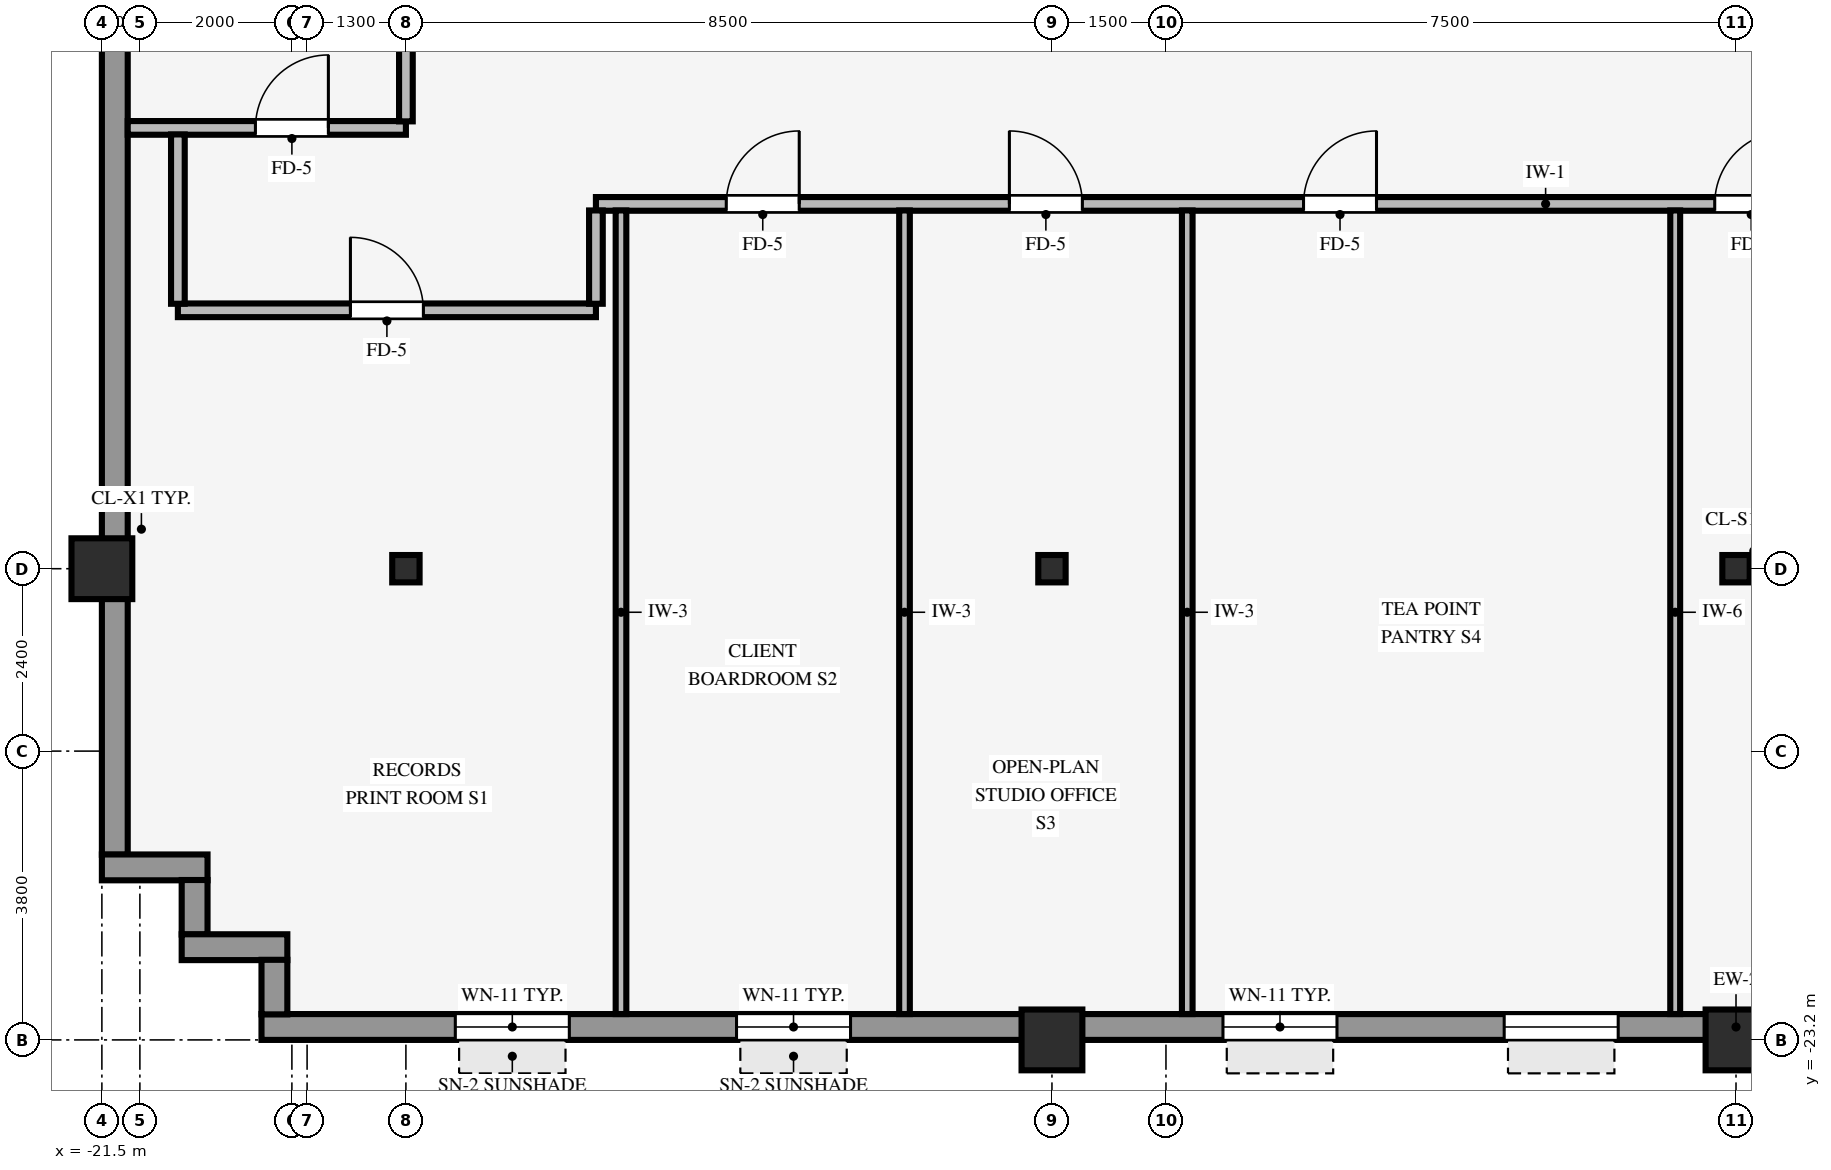
"""IFC4 building model, lengths in metres.
Left out: names, types, materials, properties, quantities, classifications, styles, units other than length and angle.
Written with IfcOpenShell. Run it as: python <this file> out.ifc"""

import sys

from ifc_helpers import new_model, si_unit, direction, frame, frame_2d, origin, origin_2d, place, context, subcontext, project, spatial, rectangle, hollow_rectangle, i_section, extrude, source, transform, mapped, element, fill, save


model = new_model("IFC4")
c1 = context("Model", 3, precision=1e-05, world=origin(), true_north=direction((0.0, 1.0)))
c2 = subcontext(c1, "Body", "Model", "MODEL_VIEW")
j1 = project(units=[si_unit("LENGTHUNIT", "METRE"), si_unit("PLANEANGLEUNIT", "RADIAN")], contexts=[c1])
p1 = place(None, origin())
s1 = spatial("IfcSite", under=j1, at=p1, CompositionType="ELEMENT")
p2 = place(p1, origin())
s2 = spatial("IfcBuilding", under=s1, at=p2, CompositionType="ELEMENT")
p3 = place(p2, frame((0.0, 0.0, 60.45)))
s3 = spatial("IfcBuildingStorey", under=s2, at=p3, CompositionType="ELEMENT", Elevation=60.45)
for number, where, z_axis, x_axis in (
    (1, (-21.5, -17.0, 0.0), (0.0, 0.0, 1.0), (1.0, 0.0, 0.0)),
    (2, (-9.0, -23.2, 0.0), (0.0, 0.0, 1.0), (1.0, 0.0, 0.0)),
    (3, (0.0, -23.2, 0.0), (0.0, 0.0, 1.0), (1.0, 0.0, 0.0)),
):
    element("IfcColumn", number, at=place(p3, frame(where, z_axis=z_axis, x_axis=x_axis)), inside=s3, PredefinedType="COLUMN", context=c2, shape_type="SweptSolid", body=[
        extrude(hollow_rectangle(XDim=0.8, YDim=0.8, WallThickness=0.055, InnerFilletRadius=0.055, OuterFilletRadius=0.11, at=origin_2d()), origin(), (0.0, 0.0, 1.0), 3.37),
    ])
for number, where, z_axis, x_axis in (
    (4, (0.0, -17.0, 0.0), (0.0, 0.0, 1.0), (1.0, 0.0, 0.0)),
    (5, (-17.5, -17.0, 0.0), (0.0, 0.0, 1.0), (1.0, 0.0, 0.0)),
    (6, (-9.0, -17.0, 0.0), (0.0, 0.0, 1.0), (1.0, 0.0, 0.0)),
):
    element("IfcColumn", number, at=place(p3, frame(where, z_axis=z_axis, x_axis=x_axis)), inside=s3, PredefinedType="COLUMN", context=c2, shape_type="SweptSolid", body=[
        extrude(i_section(OverallWidth=0.36, OverallDepth=0.36, WebThickness=0.021, FlangeThickness=0.021, FilletRadius=0.018, at=origin_2d()), origin(), (0.0, 0.0, 1.0), 3.37),
    ])
p4 = place(p3, frame((-19.4, -23.03, 0.0), z_axis=(0.0, 0.0, 1.0), x_axis=(1.0, 0.0, 0.0)))
e7 = element("IfcWall", 7, at=p4, inside=s3, PredefinedType="STANDARD", context=c2, shape_type="SweptSolid", body=[
    extrude(rectangle(XDim=38.8, YDim=0.34, at=frame_2d((19.4, 0.0))), origin(), (0.0, 0.0, 1.0), 2.705),
])
p5 = place(p4, frame((2.55, 0.0, 0.8)))
e8 = element("IfcOpeningElement", 8, at=p5, cuts=e7, PredefinedType="OPENING", context=c2, shape_type="SweptSolid", body=[
    extrude(rectangle(XDim=1.5, YDim=1.6, at=frame_2d((0.75, 0.8))), frame((0.0, 0.18, 0.0), z_axis=(0.0, -1.0, 0.0), x_axis=(1.0, 0.0, 0.0)), (0.0, 0.0, 1.0), 0.36),
])
p6 = place(p4, frame((6.25, 0.0, 0.8)))
e9 = element("IfcOpeningElement", 9, at=p6, cuts=e7, PredefinedType="OPENING", context=c2, shape_type="SweptSolid", body=[
    extrude(rectangle(XDim=1.5, YDim=1.6, at=frame_2d((0.75, 0.8))), frame((0.0, 0.18, 0.0), z_axis=(0.0, -1.0, 0.0), x_axis=(1.0, 0.0, 0.0)), (0.0, 0.0, 1.0), 0.36),
])
p7 = place(p4, frame((12.65, 0.0, 0.8)))
e10 = element("IfcOpeningElement", 10, at=p7, cuts=e7, PredefinedType="OPENING", context=c2, shape_type="SweptSolid", body=[
    extrude(rectangle(XDim=1.5, YDim=1.6, at=frame_2d((0.75, 0.8))), frame((0.0, 0.18, 0.0), z_axis=(0.0, -1.0, 0.0), x_axis=(1.0, 0.0, 0.0)), (0.0, 0.0, 1.0), 0.36),
])
p8 = place(p4, frame((16.35, 0.0, 0.8)))
e11 = element("IfcOpeningElement", 11, at=p8, cuts=e7, PredefinedType="OPENING", context=c2, shape_type="SweptSolid", body=[
    extrude(rectangle(XDim=1.5, YDim=1.6, at=frame_2d((0.75, 0.8))), frame((0.0, 0.18, 0.0), z_axis=(0.0, -1.0, 0.0), x_axis=(1.0, 0.0, 0.0)), (0.0, 0.0, 1.0), 0.36),
])
p9 = place(p4, frame((20.95, 0.0, 0.8)))
e12 = element("IfcOpeningElement", 12, at=p9, cuts=e7, PredefinedType="OPENING", context=c2, shape_type="SweptSolid", body=[
    extrude(rectangle(XDim=1.5, YDim=1.6, at=frame_2d((0.75, 0.8))), frame((0.0, 0.18, 0.0), z_axis=(0.0, -1.0, 0.0), x_axis=(1.0, 0.0, 0.0)), (0.0, 0.0, 1.0), 0.36),
])
p10 = place(p4, frame((25.55, 0.0, 0.8)))
e13 = element("IfcOpeningElement", 13, at=p10, cuts=e7, PredefinedType="OPENING", context=c2, shape_type="SweptSolid", body=[
    extrude(rectangle(XDim=1.5, YDim=1.6, at=frame_2d((0.75, 0.8))), frame((0.0, 0.18, 0.0), z_axis=(0.0, -1.0, 0.0), x_axis=(1.0, 0.0, 0.0)), (0.0, 0.0, 1.0), 0.36),
])
p11 = place(p4, frame((30.15, 0.0, 0.8)))
e14 = element("IfcOpeningElement", 14, at=p11, cuts=e7, PredefinedType="OPENING", context=c2, shape_type="SweptSolid", body=[
    extrude(rectangle(XDim=1.5, YDim=1.6, at=frame_2d((0.75, 0.8))), frame((0.0, 0.18, 0.0), z_axis=(0.0, -1.0, 0.0), x_axis=(1.0, 0.0, 0.0)), (0.0, 0.0, 1.0), 0.36),
])
p12 = place(p4, frame((34.75, 0.0, 0.8)))
e15 = element("IfcOpeningElement", 15, at=p12, cuts=e7, PredefinedType="OPENING", context=c2, shape_type="SweptSolid", body=[
    extrude(rectangle(XDim=1.5, YDim=1.6, at=frame_2d((0.75, 0.8))), frame((0.0, 0.18, 0.0), z_axis=(0.0, -1.0, 0.0), x_axis=(1.0, 0.0, 0.0)), (0.0, 0.0, 1.0), 0.36),
])
p13 = place(p3, frame((-21.33, -20.764, 0.0), z_axis=(0.0, 0.0, 1.0), x_axis=(0.0, 1.0, 0.0)))
e16 = element("IfcWall", 16, at=p13, inside=s3, PredefinedType="STANDARD", context=c2, shape_type="SweptSolid", body=[
    extrude(rectangle(XDim=41.528, YDim=0.34, at=frame_2d((20.764, 0.0))), origin(), (0.0, 0.0, 1.0), 2.705),
])
p14 = place(p13, frame((15.364, 0.0, 0.0)))
e17 = element("IfcOpeningElement", 17, at=p14, cuts=e16, PredefinedType="OPENING", context=c2, shape_type="SweptSolid", body=[
    extrude(rectangle(XDim=1.05, YDim=2.1, at=frame_2d((0.525, 1.05))), frame((0.0, 0.18, 0.0), z_axis=(0.0, -1.0, 0.0), x_axis=(1.0, 0.0, 0.0)), (0.0, 0.0, 1.0), 0.36),
])
p15 = place(p13, frame((12.202, 0.0, 0.8)))
e18 = element("IfcOpeningElement", 18, at=p15, cuts=e16, PredefinedType="OPENING", context=c2, shape_type="SweptSolid", body=[
    extrude(rectangle(XDim=2.3, YDim=1.62, at=frame_2d((1.15, 0.81))), frame((0.0, 0.18, 0.0), z_axis=(0.0, -1.0, 0.0), x_axis=(1.0, 0.0, 0.0)), (0.0, 0.0, 1.0), 0.36),
])
p16 = place(p13, frame((17.144, 0.0, 0.8)))
e19 = element("IfcOpeningElement", 19, at=p16, cuts=e16, PredefinedType="OPENING", context=c2, shape_type="SweptSolid", body=[
    extrude(rectangle(XDim=2.3, YDim=1.62, at=frame_2d((1.15, 0.81))), frame((0.0, 0.18, 0.0), z_axis=(0.0, -1.0, 0.0), x_axis=(1.0, 0.0, 0.0)), (0.0, 0.0, 1.0), 0.36),
])
p17 = place(p13, frame((27.025, 0.0, 0.8)))
e20 = element("IfcOpeningElement", 20, at=p17, cuts=e16, PredefinedType="OPENING", context=c2, shape_type="SweptSolid", body=[
    extrude(rectangle(XDim=2.3, YDim=1.62, at=frame_2d((1.15, 0.81))), frame((0.0, 0.18, 0.0), z_axis=(0.0, -1.0, 0.0), x_axis=(1.0, 0.0, 0.0)), (0.0, 0.0, 1.0), 0.36),
])
p18 = place(p3, frame((-21.5, -20.93, 0.0), z_axis=(0.0, 0.0, 1.0), x_axis=(1.0, 0.0, 0.0)))
e21 = element("IfcWall", 21, at=p18, inside=s3, PredefinedType="STANDARD", context=c2, shape_type="SweptSolid", body=[
    extrude(rectangle(XDim=1.39, YDim=0.34, at=frame_2d((0.695, 0.0))), origin(), (0.0, 0.0, 1.0), 3.36),
])
p19 = place(p3, frame((-20.28, -21.814, 0.0), z_axis=(0.0, 0.0, 1.0), x_axis=(0.0, 1.0, 0.0)))
e22 = element("IfcWall", 22, at=p19, inside=s3, PredefinedType="STANDARD", context=c2, shape_type="SweptSolid", body=[
    extrude(rectangle(XDim=0.718, YDim=0.34, at=frame_2d((0.359, 0.0))), origin(), (0.0, 0.0, 1.0), 3.36),
])
p20 = place(p3, frame((-20.45, -21.98, 0.0), z_axis=(0.0, 0.0, 1.0), x_axis=(1.0, 0.0, 0.0)))
e23 = element("IfcWall", 23, at=p20, inside=s3, PredefinedType="STANDARD", context=c2, shape_type="SweptSolid", body=[
    extrude(rectangle(XDim=1.39, YDim=0.34, at=frame_2d((0.695, 0.0))), origin(), (0.0, 0.0, 1.0), 3.36),
])
p21 = place(p3, frame((-19.23, -22.864, 0.0), z_axis=(0.0, 0.0, 1.0), x_axis=(0.0, 1.0, 0.0)))
e24 = element("IfcWall", 24, at=p21, inside=s3, PredefinedType="STANDARD", context=c2, shape_type="SweptSolid", body=[
    extrude(rectangle(XDim=0.718, YDim=0.34, at=frame_2d((0.359, 0.0))), origin(), (0.0, 0.0, 1.0), 3.36),
])
p22 = place(p3, frame((-20.5, -13.6, 0.0), z_axis=(0.0, 0.0, 1.0), x_axis=(1.0, 0.0, 0.0)))
e25 = element("IfcWall", 25, at=p22, inside=s3, PredefinedType="PARTITIONING", context=c2, shape_type="SweptSolid", body=[
    extrude(rectangle(XDim=5.5, YDim=0.18, at=frame_2d((2.75, 0.0))), origin(), (0.0, 0.0, 1.0), 2.942),
])
p23 = place(p22, frame((2.27, 0.0, 0.0)))
e26 = element("IfcOpeningElement", 26, at=p23, cuts=e25, PredefinedType="OPENING", context=c2, shape_type="SweptSolid", body=[
    extrude(rectangle(XDim=0.96, YDim=2.1, at=frame_2d((0.48, 1.05))), frame((0.0, 0.1, 0.0), z_axis=(0.0, -1.0, 0.0), x_axis=(1.0, 0.0, 0.0)), (0.0, 0.0, 1.0), 0.2),
])
p24 = place(p3, frame((-15.0, -12.2, 0.0), z_axis=(0.0, 0.0, 1.0), x_axis=(1.0, 0.0, 0.0)))
e27 = element("IfcWall", 27, at=p24, inside=s3, PredefinedType="PARTITIONING", context=c2, shape_type="SweptSolid", body=[
    extrude(rectangle(XDim=23.8, YDim=0.18, at=frame_2d((11.9, 0.0))), origin(), (0.0, 0.0, 1.0), 3.36),
])
p25 = place(p24, frame((9.31, 0.0, 0.0)))
e28 = element("IfcOpeningElement", 28, at=p25, cuts=e27, PredefinedType="OPENING", context=c2, shape_type="SweptSolid", body=[
    extrude(rectangle(XDim=0.96, YDim=2.1, at=frame_2d((0.48, 1.05))), frame((0.0, 0.1, 0.0), z_axis=(0.0, -1.0, 0.0), x_axis=(1.0, 0.0, 0.0)), (0.0, 0.0, 1.0), 0.2),
])
p26 = place(p24, frame((1.715, 0.0, 0.0)))
e29 = element("IfcOpeningElement", 29, at=p26, cuts=e27, PredefinedType="OPENING", context=c2, shape_type="SweptSolid", body=[
    extrude(rectangle(XDim=0.96, YDim=2.1, at=frame_2d((0.48, 1.05))), frame((0.0, 0.1, 0.0), z_axis=(0.0, -1.0, 0.0), x_axis=(1.0, 0.0, 0.0)), (0.0, 0.0, 1.0), 0.2),
])
p27 = place(p24, frame((5.44, 0.0, 0.0)))
e30 = element("IfcOpeningElement", 30, at=p27, cuts=e27, PredefinedType="OPENING", context=c2, shape_type="SweptSolid", body=[
    extrude(rectangle(XDim=0.96, YDim=2.1, at=frame_2d((0.48, 1.05))), frame((0.0, 0.1, 0.0), z_axis=(0.0, -1.0, 0.0), x_axis=(1.0, 0.0, 0.0)), (0.0, 0.0, 1.0), 0.2),
])
p28 = place(p24, frame((19.65, 0.0, 0.0)))
e31 = element("IfcOpeningElement", 31, at=p28, cuts=e27, PredefinedType="OPENING", context=c2, shape_type="SweptSolid", body=[
    extrude(rectangle(XDim=0.9, YDim=2.1, at=frame_2d((0.45, 1.05))), frame((0.0, 0.1, 0.0), z_axis=(0.0, -1.0, 0.0), x_axis=(1.0, 0.0, 0.0)), (0.0, 0.0, 1.0), 0.2),
])
p29 = place(p24, frame((17.05, 0.0, 0.0)))
e32 = element("IfcOpeningElement", 32, at=p29, cuts=e27, PredefinedType="OPENING", context=c2, shape_type="SweptSolid", body=[
    extrude(rectangle(XDim=0.9, YDim=2.1, at=frame_2d((0.45, 1.05))), frame((0.0, 0.1, 0.0), z_axis=(0.0, -1.0, 0.0), x_axis=(1.0, 0.0, 0.0)), (0.0, 0.0, 1.0), 0.2),
])
p30 = place(p24, frame((22.15, 0.0, 0.0)))
e33 = element("IfcOpeningElement", 33, at=p30, cuts=e27, PredefinedType="OPENING", context=c2, shape_type="SweptSolid", body=[
    extrude(rectangle(XDim=0.9, YDim=2.1, at=frame_2d((0.45, 1.05))), frame((0.0, 0.1, 0.0), z_axis=(0.0, -1.0, 0.0), x_axis=(1.0, 0.0, 0.0)), (0.0, 0.0, 1.0), 0.2),
])
p31 = place(p24, frame((14.72, 0.0, 0.0)))
e34 = element("IfcOpeningElement", 34, at=p31, cuts=e27, PredefinedType="OPENING", context=c2, shape_type="SweptSolid", body=[
    extrude(rectangle(XDim=0.96, YDim=2.1, at=frame_2d((0.48, 1.05))), frame((0.0, 0.1, 0.0), z_axis=(0.0, -1.0, 0.0), x_axis=(1.0, 0.0, 0.0)), (0.0, 0.0, 1.0), 0.2),
])
p32 = place(p3, frame((-21.16, -11.2, 0.0), z_axis=(0.0, 0.0, 1.0), x_axis=(1.0, 0.0, 0.0)))
e35 = element("IfcWall", 35, at=p32, inside=s3, PredefinedType="PARTITIONING", context=c2, shape_type="SweptSolid", body=[
    extrude(rectangle(XDim=3.66, YDim=0.18, at=frame_2d((1.83, 0.0))), origin(), (0.0, 0.0, 1.0), 3.36),
])
p33 = place(p32, frame((1.68, 0.0, 0.0)))
e36 = element("IfcOpeningElement", 36, at=p33, cuts=e35, PredefinedType="OPENING", context=c2, shape_type="SweptSolid", body=[
    extrude(rectangle(XDim=0.96, YDim=2.1, at=frame_2d((0.48, 1.05))), frame((0.0, 0.1, 0.0), z_axis=(0.0, -1.0, 0.0), x_axis=(1.0, 0.0, 0.0)), (0.0, 0.0, 1.0), 0.2),
])
p34 = place(p3, frame((-20.5, -13.514, 0.0), z_axis=(0.0, 0.0, 1.0), x_axis=(0.0, 1.0, 0.0)))
e37 = element("IfcWall", 37, at=p34, inside=s3, PredefinedType="PARTITIONING", context=c2, shape_type="SweptSolid", body=[
    extrude(rectangle(XDim=2.228, YDim=0.18, at=frame_2d((1.114, 0.0))), origin(), (0.0, 0.0, 1.0), 3.36),
])
p35 = place(p3, frame((-17.5, -11.114, 0.0), z_axis=(0.0, 0.0, 1.0), x_axis=(0.0, 1.0, 0.0)))
e38 = element("IfcWall", 38, at=p35, inside=s3, PredefinedType="PARTITIONING", context=c2, shape_type="SweptSolid", body=[
    extrude(rectangle(XDim=0.968, YDim=0.18, at=frame_2d((0.484, 0.0))), origin(), (0.0, 0.0, 1.0), 2.738),
])
p36 = place(p3, frame((-15.0, -13.514, 0.0), z_axis=(0.0, 0.0, 1.0), x_axis=(0.0, 1.0, 0.0)))
e39 = element("IfcWall", 39, at=p36, inside=s3, PredefinedType="PARTITIONING", context=c2, shape_type="SweptSolid", body=[
    extrude(rectangle(XDim=1.228, YDim=0.18, at=frame_2d((0.614, 0.0))), origin(), (0.0, 0.0, 1.0), 3.36),
])
for number, where, z_axis, x_axis in (
    (40, (-14.67, -22.86, 0.0), (0.0, 0.0, 1.0), (0.0, 1.0, 0.0)),
    (41, (-10.94, -22.86, 0.0), (0.0, 0.0, 1.0), (0.0, 1.0, 0.0)),
    (42, (-7.22, -22.86, 0.0), (0.0, 0.0, 1.0), (0.0, 1.0, 0.0)),
):
    element("IfcWall", number, at=place(p3, frame(where, z_axis=z_axis, x_axis=x_axis)), inside=s3, PredefinedType="PARTITIONING", context=c2, shape_type="SweptSolid", body=[
        extrude(rectangle(XDim=10.574, YDim=0.14, at=frame_2d((5.287, 0.0))), origin(), (0.0, 0.0, 1.0), 3.36),
    ])
p37 = place(p3, frame((-0.8, -22.86, 0.0), z_axis=(0.0, 0.0, 1.0), x_axis=(0.0, 1.0, 0.0)))
e43 = element("IfcWall", 43, at=p37, inside=s3, PredefinedType="PARTITIONING", context=c2, shape_type="SweptSolid", body=[
    extrude(rectangle(XDim=10.574, YDim=0.13, at=frame_2d((5.287, 0.0))), origin(), (0.0, 0.0, 1.0), 3.36),
])
m1 = source(origin(), c2, "Body", "SweptSolid", [
    extrude(rectangle(XDim=1.5, YDim=1.6, at=frame_2d((0.75, 0.8))), frame((0.0, 0.03, 0.0), z_axis=(0.0, -1.0, 0.0), x_axis=(1.0, 0.0, 0.0)), (0.0, 0.0, 1.0), 0.06),
])
p38 = place(p5, origin())
e44 = element("IfcWindow", 44, at=p38, inside=s3, PartitioningType="SINGLE_PANEL", PredefinedType="WINDOW", context=c2, shape_type="MappedRepresentation", body=[
    mapped(m1, transform((0.0, 0.0, 0.0), scale=1.0)),
])
fill(e8, e44)
p39 = place(p6, origin())
e45 = element("IfcWindow", 45, at=p39, inside=s3, PartitioningType="SINGLE_PANEL", PredefinedType="WINDOW", context=c2, shape_type="MappedRepresentation", body=[
    mapped(m1, transform((0.0, 0.0, 0.0), scale=1.0)),
])
fill(e9, e45)
p40 = place(p7, origin())
e46 = element("IfcWindow", 46, at=p40, inside=s3, PartitioningType="SINGLE_PANEL", PredefinedType="WINDOW", context=c2, shape_type="MappedRepresentation", body=[
    mapped(m1, transform((0.0, 0.0, 0.0), scale=1.0)),
])
fill(e10, e46)
p41 = place(p8, origin())
e47 = element("IfcWindow", 47, at=p41, inside=s3, PartitioningType="SINGLE_PANEL", PredefinedType="WINDOW", context=c2, shape_type="MappedRepresentation", body=[
    mapped(m1, transform((0.0, 0.0, 0.0), scale=1.0)),
])
fill(e11, e47)
m2 = source(origin(), c2, "Body", "SweptSolid", [
    extrude(rectangle(XDim=0.96, YDim=2.1, at=frame_2d((0.48, 1.05))), frame((0.0, 0.025, 0.0), z_axis=(0.0, -1.0, 0.0), x_axis=(1.0, 0.0, 0.0)), (0.0, 0.0, 1.0), 0.05),
])
p42 = place(p23, origin())
e48 = element("IfcDoor", 48, at=p42, inside=s3, OperationType="SINGLE_SWING_LEFT", PredefinedType="DOOR", context=c2, shape_type="MappedRepresentation", body=[
    mapped(m2, transform((0.0, 0.0, 0.0), scale=1.0)),
])
fill(e26, e48)
p43 = place(p25, origin())
e49 = element("IfcDoor", 49, at=p43, inside=s3, OperationType="SINGLE_SWING_RIGHT", PredefinedType="DOOR", context=c2, shape_type="MappedRepresentation", body=[
    mapped(m2, transform((0.0, 0.0, 0.0), scale=1.0)),
])
fill(e28, e49)
p44 = place(p26, origin())
e50 = element("IfcDoor", 50, at=p44, inside=s3, OperationType="SINGLE_SWING_RIGHT", PredefinedType="DOOR", context=c2, shape_type="MappedRepresentation", body=[
    mapped(m2, transform((0.0, 0.0, 0.0), scale=1.0)),
])
fill(e29, e50)
p45 = place(p27, origin())
e51 = element("IfcDoor", 51, at=p45, inside=s3, OperationType="SINGLE_SWING_LEFT", PredefinedType="DOOR", context=c2, shape_type="MappedRepresentation", body=[
    mapped(m2, transform((0.0, 0.0, 0.0), scale=1.0)),
])
fill(e30, e51)
p46 = place(p33, origin())
e52 = element("IfcDoor", 52, at=p46, inside=s3, OperationType="SINGLE_SWING_RIGHT", PredefinedType="DOOR", context=c2, shape_type="MappedRepresentation", body=[
    mapped(m2, transform((0.0, 0.0, 0.0), scale=1.0)),
])
fill(e36, e52)
p47 = place(p31, origin())
e53 = element("IfcDoor", 53, at=p47, inside=s3, OperationType="SINGLE_SWING_RIGHT", PredefinedType="DOOR", context=c2, shape_type="MappedRepresentation", body=[
    mapped(m2, transform((0.0, 0.0, 0.0), scale=1.0)),
])
fill(e34, e53)
save(model, sys.argv[1])
